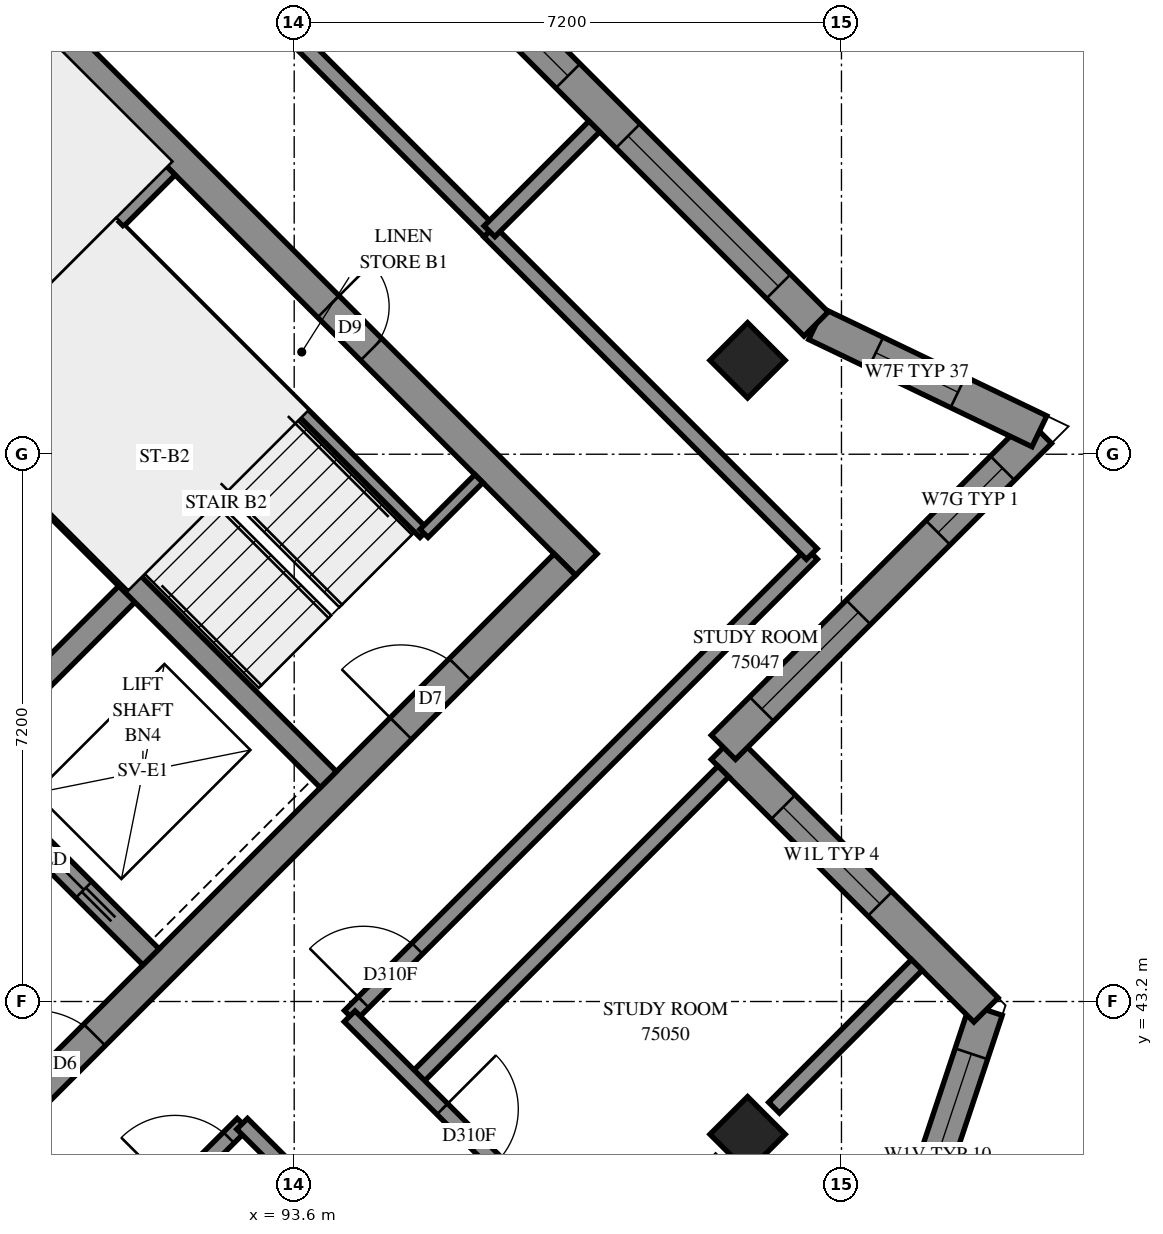
"""IFC4 building model, lengths in metres.
Left out: names, types, materials, properties, quantities, classifications, styles, units other than length and angle.
Written with IfcOpenShell. Run it as: python <this file> out.ifc"""

import sys

from ifc_helpers import new_model, si_unit, direction, frame, frame_2d, origin, origin_2d, place, context, subcontext, project, spatial, polyline, rectangle, outline, extrude, element, fill, save


model = new_model("IFC4")
c1 = context("Model", 3, precision=1e-05, world=origin(), true_north=direction((0.0, 1.0)))
c2 = subcontext(c1, "Body", "Model", "MODEL_VIEW")
j1 = project(units=[si_unit("LENGTHUNIT", "METRE"), si_unit("PLANEANGLEUNIT", "RADIAN")], contexts=[c1])
p1 = place(None, origin())
s1 = spatial("IfcSite", under=j1, at=p1, CompositionType="ELEMENT")
p2 = place(p1, origin())
s2 = spatial("IfcBuilding", under=s1, at=p2, CompositionType="ELEMENT")
p3 = place(p2, frame((0.0, 0.0, 274.4)))
s3 = spatial("IfcBuildingStorey", under=s2, at=p3, CompositionType="ELEMENT", Elevation=274.4)
for number, where, z_axis, x_axis in (
    (1, (99.565, 51.635, 0.0), (0.0, 0.0, 1.0), (0.707, -0.707, 0.0)),
    (2, (99.565, 41.453, 0.0), (0.0, 0.0, 1.0), (0.707, -0.707, 0.0)),
):
    element("IfcColumn", number, at=place(p3, frame(where, z_axis=z_axis, x_axis=x_axis)), inside=s3, PredefinedType="COLUMN", context=c2, shape_type="SweptSolid", body=[
        extrude(rectangle(XDim=0.7, YDim=0.7, at=origin_2d()), origin(), (0.0, 0.0, 1.0), 3.1),
    ])
p4 = place(p3, frame((86.695, 59.696, -0.3), z_axis=(0.0, 0.0, 1.0), x_axis=(0.7071100706, -0.7071034917, 0.0)))
e3 = element("IfcWall", 3, at=p4, inside=s3, PredefinedType="SHEAR", context=c2, shape_type="SweptSolid", body=[
    extrude(rectangle(XDim=15.2, YDim=0.4, at=frame_2d((7.6, 0.0))), origin(), (0.0, 0.0, 1.0), 2.7),
])
p5 = place(p4, frame((10.4, 0.0, 0.3)))
e4 = element("IfcOpeningElement", 4, at=p5, cuts=e3, PredefinedType="OPENING", context=c2, shape_type="SweptSolid", body=[
    extrude(rectangle(XDim=0.8, YDim=2.1, at=frame_2d((0.4, 1.05))), frame((0.0, 0.21, 0.0), z_axis=(0.0, -1.0, 0.0), x_axis=(1.0, 0.0, 0.0)), (0.0, 0.0, 1.0), 0.42),
])
p6 = place(p3, frame((86.978, 38.766, -0.3), z_axis=(0.0, 0.0, 1.0), x_axis=(0.7071067812, 0.7071067812, 0.0)))
e5 = element("IfcWall", 5, at=p6, inside=s3, PredefinedType="SHEAR", context=c2, shape_type="SweptSolid", body=[
    extrude(rectangle(XDim=14.4, YDim=0.4, at=frame_2d((7.2, 0.0))), origin(), (0.0, 0.0, 1.0), 2.7),
])
p7 = place(p6, frame((4.55, 0.0, 0.3)))
e6 = element("IfcOpeningElement", 6, at=p7, cuts=e5, PredefinedType="OPENING", context=c2, shape_type="SweptSolid", body=[
    extrude(rectangle(XDim=1.1, YDim=2.1, at=frame_2d((0.55, 1.05))), frame((0.0, 0.21, 0.0), z_axis=(0.0, -1.0, 0.0), x_axis=(1.0, 0.0, 0.0)), (0.0, 0.0, 1.0), 0.42),
])
p8 = place(p6, frame((11.35, 0.0, 0.3)))
e7 = element("IfcOpeningElement", 7, at=p8, cuts=e5, PredefinedType="OPENING", context=c2, shape_type="SweptSolid", body=[
    extrude(rectangle(XDim=1.1, YDim=2.1, at=frame_2d((0.55, 1.05))), frame((0.0, 0.21, 0.0), z_axis=(0.0, -1.0, 0.0), x_axis=(1.0, 0.0, 0.0)), (0.0, 0.0, 1.0), 0.42),
])
p9 = place(p3, frame((89.17, 46.332, 0.0), z_axis=(0.0, 0.0, 1.0), x_axis=(0.7071067812, 0.7071067812, 0.0)))
e8 = element("IfcWall", 8, at=p9, inside=s3, PredefinedType="SOLIDWALL", context=c2, shape_type="SweptSolid", body=[
    extrude(rectangle(XDim=3.3, YDim=0.3, at=frame_2d((1.65, 0.0))), origin(), (0.0, 0.0, 1.0), 3.1),
])
p10 = place(p3, frame((81.534, 53.969, 0.0), z_axis=(0.0, 0.0, 1.0), x_axis=(0.707103309, -0.7071102534, 0.0)))
e9 = element("IfcWall", 9, at=p10, inside=s3, PredefinedType="SOLIDWALL", context=c2, shape_type="SweptSolid", body=[
    extrude(rectangle(XDim=14.4, YDim=0.3, at=frame_2d((7.2, 0.0))), origin(), (0.0, 0.0, 1.0), 3.1),
])
p11 = place(p10, frame((8.55, 0.0, 0.0)))
e10 = element("IfcOpeningElement", 10, at=p11, cuts=e9, PredefinedType="OPENING", context=c2, shape_type="SweptSolid", body=[
    extrude(rectangle(XDim=0.9, YDim=2.1, at=frame_2d((0.45, 1.05))), frame((0.0, 0.16, 0.0), z_axis=(0.0, -1.0, 0.0), x_axis=(1.0, 0.0, 0.0)), (0.0, 0.0, 1.0), 0.32),
])
p12 = place(p10, frame((1.25, 0.0, 0.0)))
e11 = element("IfcOpeningElement", 11, at=p12, cuts=e9, PredefinedType="OPENING", context=c2, shape_type="SweptSolid", body=[
    extrude(rectangle(XDim=1.1, YDim=2.1, at=frame_2d((0.55, 1.05))), frame((0.0, 0.16, 0.0), z_axis=(0.0, -1.0, 0.0), x_axis=(1.0, 0.0, 0.0)), (0.0, 0.0, 1.0), 0.32),
])
p13 = place(p10, frame((4.85, 0.0, 0.0)))
e12 = element("IfcOpeningElement", 12, at=p13, cuts=e9, PredefinedType="OPENING", context=c2, shape_type="SweptSolid", body=[
    extrude(rectangle(XDim=1.1, YDim=2.1, at=frame_2d((0.55, 1.05))), frame((0.0, 0.16, 0.0), z_axis=(0.0, -1.0, 0.0), x_axis=(1.0, 0.0, 0.0)), (0.0, 0.0, 1.0), 0.32),
])
p14 = place(p10, frame((12.05, 0.0, 0.0)))
e13 = element("IfcOpeningElement", 13, at=p14, cuts=e9, PredefinedType="OPENING", context=c2, shape_type="SweptSolid", body=[
    extrude(rectangle(XDim=1.1, YDim=2.1, at=frame_2d((0.55, 1.05))), frame((0.0, 0.16, 0.0), z_axis=(0.0, -1.0, 0.0), x_axis=(1.0, 0.0, 0.0)), (0.0, 0.0, 1.0), 0.32),
])
p15 = place(p3, frame((88.958, 51.211, 0.0), z_axis=(0.0, 0.0, 1.0), x_axis=(0.7070998367, -0.7071137256, 0.0)))
e14 = element("IfcWall", 14, at=p15, inside=s3, PredefinedType="SOLIDWALL", context=c2, shape_type="SweptSolid", body=[
    extrude(rectangle(XDim=7.2, YDim=0.3, at=frame_2d((3.6, 0.0))), origin(), (0.0, 0.0, 1.0), 3.1),
])
p16 = place(p3, frame((88.958, 51.211, 0.0), z_axis=(0.0, 0.0, 1.0), x_axis=(0.7071067812, 0.7071067812, 0.0)))
e15 = element("IfcWall", 15, at=p16, inside=s3, PredefinedType="SOLIDWALL", context=c2, shape_type="SweptSolid", body=[
    extrude(rectangle(XDim=4.2, YDim=0.3, at=frame_2d((2.1, 0.0))), origin(), (0.0, 0.0, 1.0), 3.1),
])
p17 = place(p3, frame((101.082, 38.232, 0.0), z_axis=(0.0, 0.0, 1.0), x_axis=(0.316227766, 0.9486832981, 0.0)))
e16 = element("IfcWall", 16, at=p17, inside=s3, PredefinedType="SOLIDWALL", context=c2, shape_type="SweptSolid", body=[
    extrude(outline(polyline([(-0.108, -0.225), (5.259, -0.225), (4.981, 0.225), (0.108, 0.225), (-0.108, -0.225)])), origin(), (0.0, 0.0, 1.0), 3.1),
])
p18 = place(p17, frame((1.711, 0.0, 0.45)))
e17 = element("IfcOpeningElement", 17, at=p18, cuts=e16, PredefinedType="OPENING", context=c2, shape_type="SweptSolid", body=[
    extrude(rectangle(XDim=2.8, YDim=2.55, at=frame_2d((1.4, 1.275))), frame((0.0, 0.235, 0.0), z_axis=(0.0, -1.0, 0.0), x_axis=(1.0, 0.0, 0.0)), (0.0, 0.0, 1.0), 0.47),
])
p19 = place(p3, frame((102.701, 43.089, 0.0), z_axis=(0.0, 0.0, 1.0), x_axis=(-0.7070965479, 0.7071170144, 0.0)))
e18 = element("IfcWall", 18, at=p19, inside=s3, PredefinedType="SOLIDWALL", context=c2, shape_type="SweptSolid", body=[
    extrude(outline(polyline([(-0.139, -0.225), (4.661, -0.225), (5.111, 0.225), (0.139, 0.225), (-0.139, -0.225)])), origin(), (0.0, 0.0, 1.0), 3.1),
])
p20 = place(p19, frame((1.974, 0.0, 0.6)))
e19 = element("IfcOpeningElement", 19, at=p20, cuts=e18, PredefinedType="OPENING", context=c2, shape_type="SweptSolid", body=[
    extrude(rectangle(XDim=1.8, YDim=1.9, at=frame_2d((0.9, 0.95))), frame((0.0, 0.235, 0.0), z_axis=(0.0, -1.0, 0.0), x_axis=(1.0, 0.0, 0.0)), (0.0, 0.0, 1.0), 0.47),
])
p21 = place(p3, frame((99.246, 46.544, 0.0), z_axis=(0.0, 0.0, 1.0), x_axis=(0.7071067812, 0.7071067812, 0.0)))
e20 = element("IfcWall", 20, at=p21, inside=s3, PredefinedType="SOLIDWALL", context=c2, shape_type="SweptSolid", body=[
    extrude(outline(polyline([(0.225, -0.225), (6.197, -0.225), (5.562, 0.225), (-0.225, 0.225), (0.225, -0.225)])), origin(), (0.0, 0.0, 1.0), 3.1),
])
p22 = place(p21, frame((0.713, 0.0, 0.6)))
e21 = element("IfcOpeningElement", 21, at=p22, cuts=e20, PredefinedType="OPENING", context=c2, shape_type="SweptSolid", body=[
    extrude(rectangle(XDim=1.8, YDim=1.9, at=frame_2d((0.9, 0.95))), frame((0.0, 0.235, 0.0), z_axis=(0.0, -1.0, 0.0), x_axis=(1.0, 0.0, 0.0)), (0.0, 0.0, 1.0), 0.47),
])
p23 = place(p21, frame((3.994, 0.0, 0.6)))
e22 = element("IfcOpeningElement", 22, at=p23, cuts=e20, PredefinedType="OPENING", context=c2, shape_type="SweptSolid", body=[
    extrude(rectangle(XDim=1.2, YDim=1.9, at=frame_2d((0.6, 0.95))), frame((0.0, 0.235, 0.0), z_axis=(0.0, -1.0, 0.0), x_axis=(1.0, 0.0, 0.0)), (0.0, 0.0, 1.0), 0.47),
])
p24 = place(p3, frame((103.404, 50.702, 0.0), z_axis=(0.0, 0.0, 1.0), x_axis=(-0.9014267911, 0.4329315654, 0.0)))
e23 = element("IfcWall", 23, at=p24, inside=s3, PredefinedType="SOLIDWALL", context=c2, shape_type="SweptSolid", body=[
    extrude(outline(polyline([(-0.318, -0.225), (3.22, -0.225), (3.297, 0.225), (0.318, 0.225), (-0.318, -0.225)])), origin(), (0.0, 0.0, 1.0), 3.1),
])
p25 = place(p24, frame((1.188, 0.0, 0.45)))
e24 = element("IfcOpeningElement", 24, at=p25, cuts=e23, PredefinedType="OPENING", context=c2, shape_type="SweptSolid", body=[
    extrude(rectangle(XDim=1.2, YDim=2.55, at=frame_2d((0.6, 1.275))), frame((0.0, 0.235, 0.0), z_axis=(0.0, -1.0, 0.0), x_axis=(1.0, 0.0, 0.0)), (0.0, 0.0, 1.0), 0.47),
])
p26 = place(p3, frame((100.466, 52.113, 0.0), z_axis=(0.0, 0.0, 1.0), x_axis=(-0.7071067812, 0.7071067812, 0.0)))
e25 = element("IfcWall", 25, at=p26, inside=s3, PredefinedType="SOLIDWALL", context=c2, shape_type="SweptSolid", body=[
    extrude(outline(polyline([(0.038, -0.225), (6.715, -0.225), (6.753, 0.225), (-0.038, 0.225), (0.038, -0.225)])), origin(), (0.0, 0.0, 1.0), 3.1),
])
p27 = place(p26, frame((0.7, 0.0, 0.45)))
e26 = element("IfcOpeningElement", 26, at=p27, cuts=e25, PredefinedType="OPENING", context=c2, shape_type="SweptSolid", body=[
    extrude(rectangle(XDim=2.8, YDim=2.55, at=frame_2d((1.4, 1.275))), frame((0.0, 0.235, 0.0), z_axis=(0.0, -1.0, 0.0), x_axis=(1.0, 0.0, 0.0)), (0.0, 0.0, 1.0), 0.47),
])
p28 = place(p26, frame((4.617, 0.0, 0.45)))
e27 = element("IfcOpeningElement", 27, at=p28, cuts=e25, PredefinedType="OPENING", context=c2, shape_type="SweptSolid", body=[
    extrude(rectangle(XDim=1.2, YDim=2.55, at=frame_2d((0.6, 1.275))), frame((0.0, 0.235, 0.0), z_axis=(0.0, -1.0, 0.0), x_axis=(1.0, 0.0, 0.0)), (0.0, 0.0, 1.0), 0.47),
])
p29 = place(p3, frame((91.313, 53.354, 0.0), z_axis=(0.0, 0.0, 1.0), x_axis=(0.7071067812, -0.7071067812, 0.0)))
e28 = element("IfcWall", 28, at=p29, inside=s3, PredefinedType="PARTITIONING", context=c2, shape_type="SweptSolid", body=[
    extrude(rectangle(XDim=5.65, YDim=0.15, at=frame_2d((2.825, 0.0))), origin(), (0.0, 0.0, 1.0), 3.1),
])
p30 = place(p3, frame((95.308, 49.358, 0.0), z_axis=(0.0, 0.0, 1.0), x_axis=(0.70705776, 0.707155799, 0.0)))
e29 = element("IfcWall", 29, at=p30, inside=s3, PredefinedType="PARTITIONING", context=c2, shape_type="SweptSolid", body=[
    extrude(rectangle(XDim=1.02, YDim=0.15, at=frame_2d((0.51, 0.0))), origin(), (0.0, 0.0, 1.0), 3.1),
])
p31 = place(p3, frame((86.839, 35.511, 0.0), z_axis=(0.0, 0.0, 1.0), x_axis=(0.707223053, 0.7069904903, 0.0)))
e30 = element("IfcWall", 30, at=p31, inside=s3, PredefinedType="PARTITIONING", context=c2, shape_type="SweptSolid", body=[
    extrude(rectangle(XDim=8.6, YDim=0.2, at=frame_2d((4.3, 0.0))), origin(), (0.0, 0.0, 1.0), 3.1),
])
p32 = place(p31, frame((7.343, 0.0, 0.0)))
e31 = element("IfcOpeningElement", 31, at=p32, cuts=e30, PredefinedType="OPENING", context=c2, shape_type="SweptSolid", body=[
    extrude(rectangle(XDim=1.0, YDim=2.1, at=frame_2d((0.5, 1.05))), frame((0.0, 0.11, 0.0), z_axis=(0.0, -1.0, 0.0), x_axis=(1.0, 0.0, 0.0)), (0.0, 0.0, 1.0), 0.22),
])
p33 = place(p3, frame((94.332, 43.01, 0.0), z_axis=(0.0, 0.0, 1.0), x_axis=(0.7071067812, 0.7071067812, 0.0)))
e32 = element("IfcWall", 32, at=p33, inside=s3, PredefinedType="PARTITIONING", context=c2, shape_type="SweptSolid", body=[
    extrude(rectangle(XDim=8.598, YDim=0.2, at=frame_2d((4.299, 0.0))), origin(), (0.0, 0.0, 1.0), 3.1),
])
p34 = place(p33, frame((0.255, 0.0, 0.0)))
e33 = element("IfcOpeningElement", 33, at=p34, cuts=e32, PredefinedType="OPENING", context=c2, shape_type="SweptSolid", body=[
    extrude(rectangle(XDim=1.0, YDim=2.1, at=frame_2d((0.5, 1.05))), frame((0.0, 0.11, 0.0), z_axis=(0.0, -1.0, 0.0), x_axis=(1.0, 0.0, 0.0)), (0.0, 0.0, 1.0), 0.22),
])
p35 = place(p3, frame((91.08, 58.424, 0.0), z_axis=(0.0, 0.0, 1.0), x_axis=(0.7069678741, -0.707245661, 0.0)))
e34 = element("IfcWall", 34, at=p35, inside=s3, PredefinedType="PARTITIONING", context=c2, shape_type="SweptSolid", body=[
    extrude(rectangle(XDim=7.2, YDim=0.2, at=frame_2d((3.6, 0.0))), origin(), (0.0, 0.0, 1.0), 3.1),
])
p36 = place(p35, frame((2.084, 0.0, 0.0)))
e35 = element("IfcOpeningElement", 35, at=p36, cuts=e34, PredefinedType="OPENING", context=c2, shape_type="SweptSolid", body=[
    extrude(rectangle(XDim=1.0, YDim=2.1, at=frame_2d((0.5, 1.05))), frame((0.0, 0.11, 0.0), z_axis=(0.0, -1.0, 0.0), x_axis=(1.0, 0.0, 0.0)), (0.0, 0.0, 1.0), 0.22),
])
p37 = place(p3, frame((96.167, 53.329, 0.0), z_axis=(0.0, 0.0, 1.0), x_axis=(0.7071067812, -0.7071067812, 0.0)))
e36 = element("IfcWall", 36, at=p37, inside=s3, PredefinedType="PARTITIONING", context=c2, shape_type="SweptSolid", body=[
    extrude(rectangle(XDim=5.999, YDim=0.2, at=frame_2d((3.0, 0.0))), origin(), (0.0, 0.0, 1.0), 3.1),
])
p38 = place(p3, frame((95.179, 42.161, 0.0), z_axis=(0.0, 0.0, 1.0), x_axis=(0.707115476, 0.7070980863, 0.0)))
e37 = element("IfcWall", 37, at=p38, inside=s3, PredefinedType="PARTITIONING", context=c2, shape_type="SweptSolid", body=[
    extrude(rectangle(XDim=5.75, YDim=0.2, at=frame_2d((2.875, 0.0))), origin(), (0.0, 0.0, 1.0), 3.1),
])
p39 = place(p3, frame((92.915, 41.591, 0.0), z_axis=(0.0, 0.0, 1.0), x_axis=(0.7071067812, -0.7071067812, 0.0)))
e38 = element("IfcWall", 38, at=p39, inside=s3, PredefinedType="PARTITIONING", context=c2, shape_type="SweptSolid", body=[
    extrude(rectangle(XDim=4.8, YDim=0.2, at=frame_2d((2.4, 0.0))), origin(), (0.0, 0.0, 1.0), 3.1),
])
p40 = place(p39, frame((1.767, 0.0, 0.0)))
e39 = element("IfcOpeningElement", 39, at=p40, cuts=e38, PredefinedType="OPENING", context=c2, shape_type="SweptSolid", body=[
    extrude(rectangle(XDim=1.0, YDim=2.1, at=frame_2d((0.5, 1.05))), frame((0.0, 0.11, 0.0), z_axis=(0.0, -1.0, 0.0), x_axis=(1.0, 0.0, 0.0)), (0.0, 0.0, 1.0), 0.22),
])
p41 = place(p3, frame((94.329, 43.005, 0.0), z_axis=(0.0, 0.0, 1.0), x_axis=(0.7071067812, -0.7071067812, 0.0)))
e40 = element("IfcWall", 40, at=p41, inside=s3, PredefinedType="PARTITIONING", context=c2, shape_type="SweptSolid", body=[
    extrude(rectangle(XDim=4.8, YDim=0.2, at=frame_2d((2.4, 0.0))), origin(), (0.0, 0.0, 1.0), 3.1),
])
p42 = place(p41, frame((1.725, 0.0, 0.0)))
e41 = element("IfcOpeningElement", 41, at=p42, cuts=e40, PredefinedType="OPENING", context=c2, shape_type="SweptSolid", body=[
    extrude(rectangle(XDim=1.0, YDim=2.1, at=frame_2d((0.5, 1.05))), frame((0.0, 0.11, 0.0), z_axis=(0.0, -1.0, 0.0), x_axis=(1.0, 0.0, 0.0)), (0.0, 0.0, 1.0), 0.22),
])
p43 = place(p3, frame((99.913, 41.803, 0.0), z_axis=(0.0, 0.0, 1.0), x_axis=(0.7071067812, 0.7071067812, 0.0)))
e42 = element("IfcWall", 42, at=p43, inside=s3, PredefinedType="PARTITIONING", context=c2, shape_type="SweptSolid", body=[
    extrude(rectangle(XDim=2.656, YDim=0.2, at=frame_2d((1.328, 0.0))), origin(), (0.0, 0.0, 1.0), 3.1),
])
p44 = place(p3, frame((96.169, 53.333, 0.0), z_axis=(0.0, 0.0, 1.0), x_axis=(0.7070811488, 0.7071324126, 0.0)))
e43 = element("IfcWall", 43, at=p44, inside=s3, PredefinedType="PARTITIONING", context=c2, shape_type="SweptSolid", body=[
    extrude(rectangle(XDim=1.951, YDim=0.2, at=frame_2d((0.975, 0.0))), origin(), (0.0, 0.0, 1.0), 3.1),
])
p45 = place(p18, origin())
e44 = element("IfcWindow", 44, at=p45, inside=s3, PartitioningType="SINGLE_PANEL", PredefinedType="WINDOW", context=c2, shape_type="SweptSolid", body=[
    extrude(rectangle(XDim=2.8, YDim=2.55, at=frame_2d((1.4, 1.275))), frame((0.0, 0.205, 0.0), z_axis=(0.0, -1.0, 0.0), x_axis=(1.0, 0.0, 0.0)), (0.0, 0.0, 1.0), 0.06),
])
fill(e17, e44)
p46 = place(p20, origin())
e45 = element("IfcWindow", 45, at=p46, inside=s3, PartitioningType="SINGLE_PANEL", PredefinedType="WINDOW", context=c2, shape_type="SweptSolid", body=[
    extrude(rectangle(XDim=1.8, YDim=1.9, at=frame_2d((0.9, 0.95))), frame((0.0, 0.205, 0.0), z_axis=(0.0, -1.0, 0.0), x_axis=(1.0, 0.0, 0.0)), (0.0, 0.0, 1.0), 0.06),
])
fill(e19, e45)
p47 = place(p22, origin())
e46 = element("IfcWindow", 46, at=p47, inside=s3, PartitioningType="SINGLE_PANEL", PredefinedType="WINDOW", context=c2, shape_type="SweptSolid", body=[
    extrude(rectangle(XDim=1.8, YDim=1.9, at=frame_2d((0.9, 0.95))), frame((0.0, 0.205, 0.0), z_axis=(0.0, -1.0, 0.0), x_axis=(1.0, 0.0, 0.0)), (0.0, 0.0, 1.0), 0.06),
])
fill(e21, e46)
p48 = place(p23, origin())
e47 = element("IfcWindow", 47, at=p48, inside=s3, PartitioningType="SINGLE_PANEL", PredefinedType="WINDOW", context=c2, shape_type="SweptSolid", body=[
    extrude(rectangle(XDim=1.2, YDim=1.9, at=frame_2d((0.6, 0.95))), frame((0.0, 0.205, 0.0), z_axis=(0.0, -1.0, 0.0), x_axis=(1.0, 0.0, 0.0)), (0.0, 0.0, 1.0), 0.06),
])
fill(e22, e47)
p49 = place(p25, origin())
e48 = element("IfcWindow", 48, at=p49, inside=s3, PartitioningType="SINGLE_PANEL", PredefinedType="WINDOW", context=c2, shape_type="SweptSolid", body=[
    extrude(rectangle(XDim=1.2, YDim=2.55, at=frame_2d((0.6, 1.275))), frame((0.0, 0.205, 0.0), z_axis=(0.0, -1.0, 0.0), x_axis=(1.0, 0.0, 0.0)), (0.0, 0.0, 1.0), 0.06),
])
fill(e24, e48)
p50 = place(p27, origin())
e49 = element("IfcWindow", 49, at=p50, inside=s3, PartitioningType="SINGLE_PANEL", PredefinedType="WINDOW", context=c2, shape_type="SweptSolid", body=[
    extrude(rectangle(XDim=2.8, YDim=2.55, at=frame_2d((1.4, 1.275))), frame((0.0, 0.205, 0.0), z_axis=(0.0, -1.0, 0.0), x_axis=(1.0, 0.0, 0.0)), (0.0, 0.0, 1.0), 0.06),
])
fill(e26, e49)
p51 = place(p28, origin())
e50 = element("IfcWindow", 50, at=p51, inside=s3, PartitioningType="SINGLE_PANEL", PredefinedType="WINDOW", context=c2, shape_type="SweptSolid", body=[
    extrude(rectangle(XDim=1.2, YDim=2.55, at=frame_2d((0.6, 1.275))), frame((0.0, 0.205, 0.0), z_axis=(0.0, -1.0, 0.0), x_axis=(1.0, 0.0, 0.0)), (0.0, 0.0, 1.0), 0.06),
])
fill(e27, e50)
p52 = place(p5, origin())
e51 = element("IfcDoor", 51, at=p52, inside=s3, OperationType="SINGLE_SWING_RIGHT", PredefinedType="DOOR", context=c2, shape_type="SweptSolid", body=[
    extrude(rectangle(XDim=0.8, YDim=2.1, at=frame_2d((0.4, 1.05))), frame((0.0, 0.025, 0.0), z_axis=(0.0, -1.0, 0.0), x_axis=(1.0, 0.0, 0.0)), (0.0, 0.0, 1.0), 0.05),
])
fill(e4, e51)
p53 = place(p7, origin())
e52 = element("IfcDoor", 52, at=p53, inside=s3, OperationType="DOUBLE_DOOR_SINGLE_SWING", PredefinedType="DOOR", context=c2, shape_type="SweptSolid", body=[
    extrude(rectangle(XDim=1.1, YDim=2.1, at=frame_2d((0.55, 1.05))), frame((0.0, 0.025, 0.0), z_axis=(0.0, -1.0, 0.0), x_axis=(1.0, 0.0, 0.0)), (0.0, 0.0, 1.0), 0.05),
])
fill(e6, e52)
p54 = place(p8, origin())
e53 = element("IfcDoor", 53, at=p54, inside=s3, OperationType="SINGLE_SWING_RIGHT", PredefinedType="DOOR", context=c2, shape_type="SweptSolid", body=[
    extrude(rectangle(XDim=1.1, YDim=2.1, at=frame_2d((0.55, 1.05))), frame((0.0, 0.025, 0.0), z_axis=(0.0, -1.0, 0.0), x_axis=(1.0, 0.0, 0.0)), (0.0, 0.0, 1.0), 0.05),
])
fill(e7, e53)
p55 = place(p14, origin())
e54 = element("IfcDoor", 54, at=p55, inside=s3, OperationType="SLIDING_TO_RIGHT", PredefinedType="DOOR", context=c2, shape_type="SweptSolid", body=[
    extrude(rectangle(XDim=1.1, YDim=2.1, at=frame_2d((0.55, 1.05))), frame((0.0, 0.025, 0.0), z_axis=(0.0, -1.0, 0.0), x_axis=(1.0, 0.0, 0.0)), (0.0, 0.0, 1.0), 0.05),
])
fill(e13, e54)
p56 = place(p34, origin())
e55 = element("IfcDoor", 55, at=p56, inside=s3, OperationType="SINGLE_SWING_RIGHT", PredefinedType="DOOR", context=c2, shape_type="SweptSolid", body=[
    extrude(rectangle(XDim=1.0, YDim=2.1, at=frame_2d((0.5, 1.05))), frame((0.0, 0.025, 0.0), z_axis=(0.0, -1.0, 0.0), x_axis=(1.0, 0.0, 0.0)), (0.0, 0.0, 1.0), 0.05),
])
fill(e33, e55)
p57 = place(p32, origin())
e56 = element("IfcDoor", 56, at=p57, inside=s3, OperationType="SINGLE_SWING_RIGHT", PredefinedType="DOOR", context=c2, shape_type="SweptSolid", body=[
    extrude(rectangle(XDim=1.0, YDim=2.1, at=frame_2d((0.5, 1.05))), frame((0.0, 0.025, 0.0), z_axis=(0.0, -1.0, 0.0), x_axis=(1.0, 0.0, 0.0)), (0.0, 0.0, 1.0), 0.05),
])
fill(e31, e56)
p58 = place(p42, origin())
e57 = element("IfcDoor", 57, at=p58, inside=s3, OperationType="SINGLE_SWING_RIGHT", PredefinedType="DOOR", context=c2, shape_type="SweptSolid", body=[
    extrude(rectangle(XDim=1.0, YDim=2.1, at=frame_2d((0.5, 1.05))), frame((0.0, 0.025, 0.0), z_axis=(0.0, -1.0, 0.0), x_axis=(1.0, 0.0, 0.0)), (0.0, 0.0, 1.0), 0.05),
])
fill(e41, e57)
save(model, sys.argv[1])
